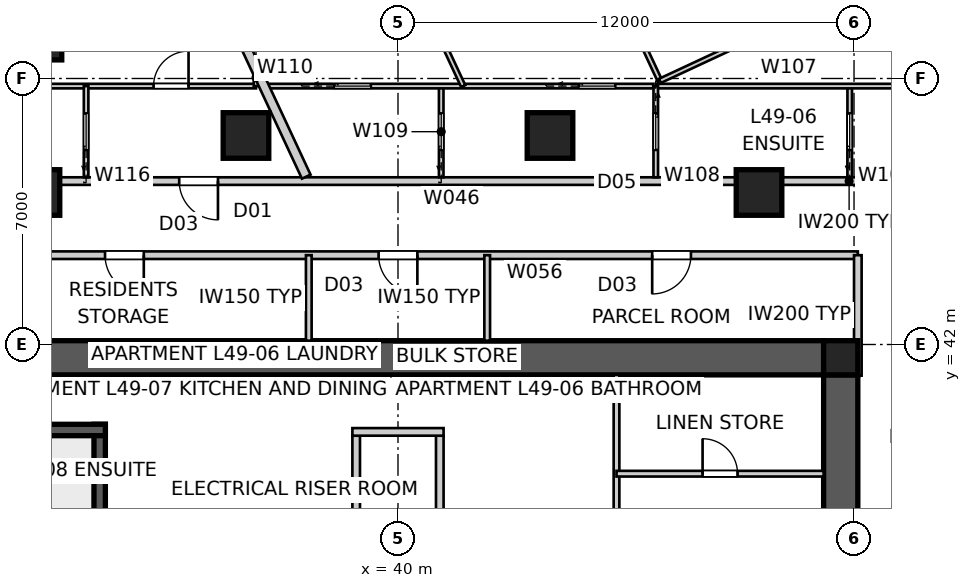
"""IFC4 building model, lengths in metres.
Left out: names, types, materials, properties, quantities, classifications, styles, units other than length and angle.
Written with IfcOpenShell. Run it as: python <this file> out.ifc"""

import sys

from ifc_helpers import new_model, si_unit, direction, frame, frame_2d, origin, origin_2d, place, context, subcontext, project, spatial, polyline, rectangle, outline, extrude, element, fill, save


model = new_model("IFC4")
c1 = context("Model", 3, precision=1e-05, world=origin(), true_north=direction((0.0, 1.0)))
c2 = subcontext(c1, "Body", "Model", "MODEL_VIEW")
j1 = project(units=[si_unit("LENGTHUNIT", "METRE"), si_unit("PLANEANGLEUNIT", "RADIAN")], contexts=[c1])
p1 = place(None, origin())
s1 = spatial("IfcSite", under=j1, at=p1, CompositionType="ELEMENT")
p2 = place(p1, origin())
s2 = spatial("IfcBuilding", under=s1, at=p2, CompositionType="ELEMENT")
p3 = place(p2, frame((0.0, 0.0, 179.4)))
s3 = spatial("IfcBuildingStorey", under=s2, at=p3, CompositionType="ELEMENT", Elevation=179.4)
p4 = place(p3, frame((28.8, 41.65, 0.0), z_axis=(0.0, 0.0, 1.0), x_axis=(1.0, 0.0, 0.0)))
e1 = element("IfcWall", 1, at=p4, inside=s3, PredefinedType="SHEAR", context=c2, shape_type="SweptSolid", body=[
    extrude(outline(polyline([(0.0, -0.45), (22.4, -0.45), (22.4, -0.025), (22.85, -0.025), (22.85, 0.025), (22.4, 0.025), (22.4, 0.45), (0.0, 0.45), (0.0, 0.025), (-0.45, 0.025), (-0.45, -0.025), (0.0, -0.025), (0.0, -0.45)])), origin(), (0.0, 0.0, 1.0), 3.4),
])
p5 = place(p3, frame((51.65, 18.8, 0.0), z_axis=(0.0, 0.0, 1.0), x_axis=(0.0, 1.0, 0.0)))
e2 = element("IfcWall", 2, at=p5, inside=s3, PredefinedType="SHEAR", context=c2, shape_type="SweptSolid", body=[
    extrude(outline(polyline([(0.0, -0.45), (22.4, -0.45), (22.4, -0.025), (22.85, -0.025), (22.85, 0.025), (22.4, 0.025), (22.4, 0.45), (0.0, 0.45), (0.0, 0.025), (-0.45, 0.025), (-0.45, -0.025), (0.0, -0.025), (0.0, -0.45)])), origin(), (0.0, 0.0, 1.0), 3.4),
])
p6 = place(p5, frame((11.14, 0.0, 0.0)))
e3 = element("IfcOpeningElement", 3, at=p6, cuts=e2, PredefinedType="OPENING", context=c2, shape_type="SweptSolid", body=[
    extrude(rectangle(XDim=1.02, YDim=2.4, at=frame_2d((0.51, 1.2))), frame((0.0, 0.46, 0.0), z_axis=(0.0, -1.0, 0.0), x_axis=(1.0, 0.0, 0.0)), (0.0, 0.0, 1.0), 0.92),
])
p7 = place(p3, frame((32.15, 32.2, 0.0), z_axis=(0.0, 0.0, 1.0), x_axis=(0.0, 1.0, 0.0)))
e4 = element("IfcWall", 4, at=p7, inside=s3, PredefinedType="SHEAR", context=c2, shape_type="SweptSolid", body=[
    extrude(rectangle(XDim=7.7, YDim=0.3, at=frame_2d((3.85, 0.0))), origin(), (0.0, 0.0, 1.0), 3.4),
])
p8 = place(p3, frame((28.8, 39.75, 0.0), z_axis=(0.0, 0.0, 1.0), x_axis=(1.0, 0.0, 0.0)))
e5 = element("IfcWall", 5, at=p8, inside=s3, PredefinedType="SHEAR", context=c2, shape_type="SweptSolid", body=[
    extrude(rectangle(XDim=3.5, YDim=0.3, at=frame_2d((1.75, 0.0))), origin(), (0.0, 0.0, 1.0), 3.4),
])
for number, where, z_axis, x_axis in (
    (6, (38.9, 37.6, 0.0), (0.0, 0.0, 1.0), (0.0, 1.0, 0.0)),
    (7, (41.1, 37.6, 0.0), (0.0, 0.0, 1.0), (0.0, 1.0, 0.0)),
):
    element("IfcWall", number, at=place(p3, frame(where, z_axis=z_axis, x_axis=x_axis)), inside=s3, PredefinedType="SOLIDWALL", context=c2, shape_type="SweptSolid", body=[
        extrude(rectangle(XDim=2.0, YDim=0.2, at=frame_2d((1.0, 0.0))), origin(), (0.0, 0.0, 1.0), 3.4),
    ])
p9 = place(p3, frame((38.8, 39.7, 0.0), z_axis=(0.0, 0.0, 1.0), x_axis=(1.0, 0.0, 0.0)))
e8 = element("IfcWall", 8, at=p9, inside=s3, PredefinedType="SOLIDWALL", context=c2, shape_type="SweptSolid", body=[
    extrude(rectangle(XDim=2.4, YDim=0.2, at=frame_2d((1.2, 0.0))), origin(), (0.0, 0.0, 1.0), 3.4),
])
for number, where, z_axis, x_axis in (
    (9, (51.65, 41.65, 0.0), (0.0, 0.0, 1.0), (1.0, 0.0, 0.0)),
    (10, (30.702, 49.939, 0.0), (0.0, 0.0, 1.0), (1.0, 0.0, 0.0)),
):
    element("IfcColumn", number, at=place(p3, frame(where, z_axis=z_axis, x_axis=x_axis)), inside=s3, PredefinedType="COLUMN", context=c2, shape_type="SweptSolid", body=[
        extrude(rectangle(XDim=0.9, YDim=0.9, at=origin_2d()), origin(), (0.0, 0.0, 1.0), 3.4),
    ])
for number, where, z_axis, x_axis in (
    (11, (49.5, 46.0, 0.0), (0.0, 0.0, 1.0), (1.0, 0.0, 0.0)),
    (12, (44.0, 47.5, 0.0), (0.0, 0.0, 1.0), (1.0, 0.0, 0.0)),
    (13, (36.0, 47.5, 0.0), (0.0, 0.0, 1.0), (1.0, 0.0, 0.0)),
    (14, (30.5, 46.0, 0.0), (0.0, 0.0, 1.0), (1.0, 0.0, 0.0)),
):
    element("IfcColumn", number, at=place(p3, frame(where, z_axis=z_axis, x_axis=x_axis)), inside=s3, PredefinedType="COLUMN", context=c2, shape_type="SweptSolid", body=[
        extrude(rectangle(XDim=1.2, YDim=1.2, at=origin_2d()), origin(), (0.0, 0.0, 1.0), 3.4),
    ])
p10 = place(p3, frame((54.5, 46.3, 0.0), z_axis=(0.0, 0.0, 1.0), x_axis=(-1.0, 0.0, 0.0)))
e15 = element("IfcWall", 15, at=p10, inside=s3, PredefinedType="PARTITIONING", context=c2, shape_type="SweptSolid", body=[
    extrude(rectangle(XDim=5.258, YDim=0.2, at=frame_2d((2.629, 0.0))), origin(), (0.0, 0.0, 1.0), 3.25),
])
p11 = place(p3, frame((49.242, 46.3, 0.0), z_axis=(0.0, 0.0, 1.0), x_axis=(-1.0, 0.0, 0.0)))
e16 = element("IfcWall", 16, at=p11, inside=s3, PredefinedType="PARTITIONING", context=c2, shape_type="SweptSolid", body=[
    extrude(rectangle(XDim=1.683, YDim=0.2, at=frame_2d((0.842, 0.0))), origin(), (0.0, 0.0, 1.0), 2.55),
])
p12 = place(p3, frame((47.558, 46.3, 0.0), z_axis=(0.0, 0.0, 1.0), x_axis=(-1.0, 0.0, 0.0)))
e17 = element("IfcWall", 17, at=p12, inside=s3, PredefinedType="PARTITIONING", context=c2, shape_type="SweptSolid", body=[
    extrude(rectangle(XDim=15.117, YDim=0.2, at=frame_2d((7.558, 0.0))), origin(), (0.0, 0.0, 1.0), 3.25),
])
p13 = place(p12, frame((12.295, 0.0, 0.0)))
e18 = element("IfcOpeningElement", 18, at=p13, cuts=e17, PredefinedType="OPENING", context=c2, shape_type="SweptSolid", body=[
    extrude(rectangle(XDim=1.02, YDim=2.34, at=frame_2d((0.51, 1.17))), frame((0.0, 0.11, 0.0), z_axis=(0.0, -1.0, 0.0), x_axis=(1.0, 0.0, 0.0)), (0.0, 0.0, 1.0), 0.22),
])
p14 = place(p3, frame((32.442, 46.3, 0.0), z_axis=(0.0, 0.0, 1.0), x_axis=(-1.0, 0.0, 0.0)))
e19 = element("IfcWall", 19, at=p14, inside=s3, PredefinedType="PARTITIONING", context=c2, shape_type="SweptSolid", body=[
    extrude(rectangle(XDim=1.683, YDim=0.2, at=frame_2d((0.842, 0.0))), origin(), (0.0, 0.0, 1.0), 2.55),
])
p15 = place(p3, frame((34.585, 52.853, 0.0), z_axis=(0.0, 0.0, 1.0), x_axis=(0.422623839356, -0.906305186131, 0.0)))
e20 = element("IfcWall", 20, at=p15, inside=s3, PredefinedType="PARTITIONING", context=c2, shape_type="SweptSolid", body=[
    extrude(rectangle(XDim=7.101, YDim=0.25, at=frame_2d((3.551, 0.0))), origin(), (0.0, 0.0, 1.0), 3.25),
])
p16 = place(p3, frame((45.75, 41.2, 0.0), z_axis=(0.0, 0.0, 1.0), x_axis=(0.0, -1.0, 0.0)))
e21 = element("IfcWall", 21, at=p16, inside=s3, PredefinedType="SOLIDWALL", context=c2, shape_type="SweptSolid", body=[
    extrude(rectangle(XDim=5.9, YDim=0.15, at=frame_2d((2.95, 0.0))), origin(), (0.0, 0.0, 1.0), 3.25),
])
p17 = place(p3, frame((45.75, 38.6, 0.0), z_axis=(0.0, 0.0, 1.0), x_axis=(1.0, 0.0, 0.0)))
e22 = element("IfcWall", 22, at=p17, inside=s3, PredefinedType="SOLIDWALL", context=c2, shape_type="SweptSolid", body=[
    extrude(rectangle(XDim=5.45, YDim=0.15, at=frame_2d((2.725, 0.0))), origin(), (0.0, 0.0, 1.0), 3.25),
])
p18 = place(p17, frame((2.265, 0.0, 0.0)))
e23 = element("IfcOpeningElement", 23, at=p18, cuts=e22, PredefinedType="OPENING", context=c2, shape_type="SweptSolid", body=[
    extrude(rectangle(XDim=0.92, YDim=2.1, at=frame_2d((0.46, 1.05))), frame((0.0, 0.085, 0.0), z_axis=(0.0, -1.0, 0.0), x_axis=(1.0, 0.0, 0.0)), (0.0, 0.0, 1.0), 0.17),
])
p19 = place(p3, frame((52.1, 44.35, 0.0), z_axis=(0.0, 0.0, 1.0), x_axis=(-1.0, 0.0, 0.0)))
e24 = element("IfcWall", 24, at=p19, inside=s3, PredefinedType="PARTITIONING", context=c2, shape_type="SweptSolid", body=[
    extrude(rectangle(XDim=24.2, YDim=0.2, at=frame_2d((12.1, 0.0))), origin(), (0.0, 0.0, 1.0), 3.25),
])
p20 = place(p19, frame((18.789, 0.0, 0.0)))
e25 = element("IfcOpeningElement", 25, at=p20, cuts=e24, PredefinedType="OPENING", context=c2, shape_type="SweptSolid", body=[
    extrude(rectangle(XDim=1.02, YDim=2.1, at=frame_2d((0.51, 1.05))), frame((0.0, 0.11, 0.0), z_axis=(0.0, -1.0, 0.0), x_axis=(1.0, 0.0, 0.0)), (0.0, 0.0, 1.0), 0.22),
])
p21 = place(p19, frame((4.391, 0.0, 0.0)))
e26 = element("IfcOpeningElement", 26, at=p21, cuts=e24, PredefinedType="OPENING", context=c2, shape_type="SweptSolid", body=[
    extrude(rectangle(XDim=1.02, YDim=2.1, at=frame_2d((0.51, 1.05))), frame((0.0, 0.11, 0.0), z_axis=(0.0, -1.0, 0.0), x_axis=(1.0, 0.0, 0.0)), (0.0, 0.0, 1.0), 0.22),
])
p22 = place(p19, frame((11.59, 0.0, 0.0)))
e27 = element("IfcOpeningElement", 27, at=p22, cuts=e24, PredefinedType="OPENING", context=c2, shape_type="SweptSolid", body=[
    extrude(rectangle(XDim=1.02, YDim=2.1, at=frame_2d((0.51, 1.05))), frame((0.0, 0.11, 0.0), z_axis=(0.0, -1.0, 0.0), x_axis=(1.0, 0.0, 0.0)), (0.0, 0.0, 1.0), 0.22),
])
p23 = place(p3, frame((52.1, 41.18, 0.0), z_axis=(0.0, 0.0, 1.0), x_axis=(0.0, 1.0, 0.0)))
e28 = element("IfcWall", 28, at=p23, inside=s3, PredefinedType="PARTITIONING", context=c2, shape_type="SweptSolid", body=[
    extrude(rectangle(XDim=3.17, YDim=0.2, at=frame_2d((1.585, 0.0))), origin(), (0.0, 0.0, 1.0), 3.25),
])
for number, where, z_axis, x_axis in (
    (29, (37.653, 42.1, 0.0), (0.0, 0.0, 1.0), (0.0, 1.0, 0.0)),
    (30, (42.347, 42.1, 0.0), (0.0, 0.0, 1.0), (0.0, 1.0, 0.0)),
):
    element("IfcWall", number, at=place(p3, frame(where, z_axis=z_axis, x_axis=x_axis)), inside=s3, PredefinedType="SOLIDWALL", context=c2, shape_type="SweptSolid", body=[
        extrude(rectangle(XDim=2.25, YDim=0.15, at=frame_2d((1.125, 0.0))), origin(), (0.0, 0.0, 1.0), 3.25),
    ])
p24 = place(p3, frame((51.886, 46.4, 0.0), z_axis=(0.0, 0.0, 1.0), x_axis=(0.0, 1.0, 0.0)))
e31 = element("IfcWall", 31, at=p24, inside=s3, PredefinedType="PARTITIONING", context=c2, shape_type="SweptSolid", body=[
    extrude(rectangle(XDim=2.4, YDim=0.12, at=frame_2d((1.2, 0.0))), origin(), (0.0, 0.0, 1.0), 3.25),
])
p25 = place(p24, frame((0.72, 0.0, 0.0)))
e32 = element("IfcOpeningElement", 32, at=p25, cuts=e31, PredefinedType="OPENING", context=c2, shape_type="SweptSolid", body=[
    extrude(rectangle(XDim=0.96, YDim=2.1, at=frame_2d((0.48, 1.05))), frame((0.0, 0.07, 0.0), z_axis=(0.0, -1.0, 0.0), x_axis=(1.0, 0.0, 0.0)), (0.0, 0.0, 1.0), 0.14),
])
p26 = place(p3, frame((46.783, 48.8, 0.0), z_axis=(0.0, 0.0, 1.0), x_axis=(1.0, 0.0, 0.0)))
e33 = element("IfcWall", 33, at=p26, inside=s3, PredefinedType="PARTITIONING", context=c2, shape_type="SweptSolid", body=[
    extrude(rectangle(XDim=9.784, YDim=0.12, at=frame_2d((4.892, 0.0))), origin(), (0.0, 0.0, 1.0), 3.25),
])
p27 = place(p26, frame((7.006, 0.0, 0.0)))
e34 = element("IfcOpeningElement", 34, at=p27, cuts=e33, PredefinedType="OPENING", context=c2, shape_type="SweptSolid", body=[
    extrude(rectangle(XDim=0.92, YDim=2.34, at=frame_2d((0.46, 1.17))), frame((0.0, 0.07, 0.0), z_axis=(0.0, -1.0, 0.0), x_axis=(1.0, 0.0, 0.0)), (0.0, 0.0, 1.0), 0.14),
])
p28 = place(p3, frame((46.783, 48.8, 0.0), z_axis=(0.0, 0.0, 1.0), x_axis=(0.0, -1.0, 0.0)))
e35 = element("IfcWall", 35, at=p28, inside=s3, PredefinedType="PARTITIONING", context=c2, shape_type="SweptSolid", body=[
    extrude(rectangle(XDim=2.4, YDim=0.12, at=frame_2d((1.2, 0.0))), origin(), (0.0, 0.0, 1.0), 3.25),
])
p29 = place(p28, frame((0.72, 0.0, 0.0)))
e36 = element("IfcOpeningElement", 36, at=p29, cuts=e35, PredefinedType="OPENING", context=c2, shape_type="SweptSolid", body=[
    extrude(rectangle(XDim=0.96, YDim=2.1, at=frame_2d((0.48, 1.05))), frame((0.0, 0.07, 0.0), z_axis=(0.0, -1.0, 0.0), x_axis=(1.0, 0.0, 0.0)), (0.0, 0.0, 1.0), 0.14),
])
p30 = place(p3, frame((41.137, 46.4, 0.0), z_axis=(0.0, 0.0, 1.0), x_axis=(0.0, 1.0, 0.0)))
e37 = element("IfcWall", 37, at=p30, inside=s3, PredefinedType="PARTITIONING", context=c2, shape_type="SweptSolid", body=[
    extrude(rectangle(XDim=2.4, YDim=0.12, at=frame_2d((1.2, 0.0))), origin(), (0.0, 0.0, 1.0), 3.25),
])
p31 = place(p30, frame((0.72, 0.0, 0.0)))
e38 = element("IfcOpeningElement", 38, at=p31, cuts=e37, PredefinedType="OPENING", context=c2, shape_type="SweptSolid", body=[
    extrude(rectangle(XDim=0.96, YDim=2.1, at=frame_2d((0.48, 1.05))), frame((0.0, 0.07, 0.0), z_axis=(0.0, -1.0, 0.0), x_axis=(1.0, 0.0, 0.0)), (0.0, 0.0, 1.0), 0.14),
])
p32 = place(p3, frame((36.475, 48.8, 0.0), z_axis=(0.0, 0.0, 1.0), x_axis=(1.0, 0.0, 0.0)))
e39 = element("IfcWall", 39, at=p32, inside=s3, PredefinedType="PARTITIONING", context=c2, shape_type="SweptSolid", body=[
    extrude(rectangle(XDim=10.242, YDim=0.12, at=frame_2d((5.121, 0.0))), origin(), (0.0, 0.0, 1.0), 3.25),
])
p33 = place(p32, frame((8.284, 0.0, 0.0)))
e40 = element("IfcOpeningElement", 40, at=p33, cuts=e39, PredefinedType="OPENING", context=c2, shape_type="SweptSolid", body=[
    extrude(rectangle(XDim=0.96, YDim=2.1, at=frame_2d((0.48, 1.05))), frame((0.0, 0.07, 0.0), z_axis=(0.0, -1.0, 0.0), x_axis=(1.0, 0.0, 0.0)), (0.0, 0.0, 1.0), 0.14),
])
p34 = place(p32, frame((1.851, 0.0, 0.0)))
e41 = element("IfcOpeningElement", 41, at=p34, cuts=e39, PredefinedType="OPENING", context=c2, shape_type="SweptSolid", body=[
    extrude(rectangle(XDim=0.96, YDim=2.1, at=frame_2d((0.48, 1.05))), frame((0.0, 0.07, 0.0), z_axis=(0.0, -1.0, 0.0), x_axis=(1.0, 0.0, 0.0)), (0.0, 0.0, 1.0), 0.14),
])
p35 = place(p3, frame((46.893, 48.937, 0.0), z_axis=(0.0, 0.0, 1.0), x_axis=(-0.422638395676, 0.906298398156, 0.0)))
e42 = element("IfcWall", 42, at=p35, inside=s3, PredefinedType="PARTITIONING", context=c2, shape_type="SweptSolid", body=[
    extrude(rectangle(XDim=8.71, YDim=0.12, at=frame_2d((4.355, 0.0))), origin(), (0.0, 0.0, 1.0), 3.25),
])
p36 = place(p3, frame((54.787, 52.618, 0.0), z_axis=(0.0, 0.0, 1.0), x_axis=(-0.906314140712, -0.422604635972, 0.0)))
e43 = element("IfcWall", 43, at=p36, inside=s3, PredefinedType="PARTITIONING", context=c2, shape_type="SweptSolid", body=[
    extrude(rectangle(XDim=8.71, YDim=0.12, at=frame_2d((4.355, 0.0))), origin(), (0.0, 0.0, 1.0), 3.25),
])
p37 = place(p36, frame((3.875, 0.0, 0.0)))
e44 = element("IfcOpeningElement", 44, at=p37, cuts=e43, PredefinedType="OPENING", context=c2, shape_type="SweptSolid", body=[
    extrude(rectangle(XDim=0.92, YDim=2.34, at=frame_2d((0.46, 1.17))), frame((0.0, 0.07, 0.0), z_axis=(0.0, -1.0, 0.0), x_axis=(1.0, 0.0, 0.0)), (0.0, 0.0, 1.0), 0.14),
])
p38 = place(p3, frame((41.716, 48.8, 0.0), z_axis=(0.0, 0.0, 1.0), x_axis=(-0.422642131948, 0.906296655793, 0.0)))
e45 = element("IfcWall", 45, at=p38, inside=s3, PredefinedType="PARTITIONING", context=c2, shape_type="SweptSolid", body=[
    extrude(rectangle(XDim=6.646, YDim=0.12, at=frame_2d((3.323, 0.0))), origin(), (0.0, 0.0, 1.0), 3.25),
])
p39 = place(p3, frame((25.993, 48.8, 0.0), z_axis=(0.0, 0.0, 1.0), x_axis=(1.0, 0.0, 0.0)))
e46 = element("IfcWall", 46, at=p39, inside=s3, PredefinedType="PARTITIONING", context=c2, shape_type="SweptSolid", body=[
    extrude(rectangle(XDim=10.272, YDim=0.12, at=frame_2d((5.136, 0.0))), origin(), (0.0, 0.0, 1.0), 3.25),
])
p40 = place(p39, frame((7.576, 0.0, 0.0)))
e47 = element("IfcOpeningElement", 47, at=p40, cuts=e46, PredefinedType="OPENING", context=c2, shape_type="SweptSolid", body=[
    extrude(rectangle(XDim=0.92, YDim=2.34, at=frame_2d((0.46, 1.17))), frame((0.0, 0.07, 0.0), z_axis=(0.0, -1.0, 0.0), x_axis=(1.0, 0.0, 0.0)), (0.0, 0.0, 1.0), 0.14),
])
p41 = place(p3, frame((36.265, 48.8, 0.0), z_axis=(0.0, 0.0, 1.0), x_axis=(0.0, 1.0, 0.0)))
e48 = element("IfcWall", 48, at=p41, inside=s3, PredefinedType="PARTITIONING", context=c2, shape_type="SweptSolid", body=[
    extrude(rectangle(XDim=0.45, YDim=0.12, at=frame_2d((0.225, 0.0))), origin(), (0.0, 0.0, 1.0), 3.25),
])
p42 = place(p3, frame((31.793, 46.4, 0.0), z_axis=(0.0, 0.0, 1.0), x_axis=(0.0, 1.0, 0.0)))
e49 = element("IfcWall", 49, at=p42, inside=s3, PredefinedType="PARTITIONING", context=c2, shape_type="SweptSolid", body=[
    extrude(rectangle(XDim=2.4, YDim=0.12, at=frame_2d((1.2, 0.0))), origin(), (0.0, 0.0, 1.0), 3.25),
])
p43 = place(p42, frame((0.72, 0.0, 0.0)))
e50 = element("IfcOpeningElement", 50, at=p43, cuts=e49, PredefinedType="OPENING", context=c2, shape_type="SweptSolid", body=[
    extrude(rectangle(XDim=0.96, YDim=2.1, at=frame_2d((0.48, 1.05))), frame((0.0, 0.07, 0.0), z_axis=(0.0, -1.0, 0.0), x_axis=(1.0, 0.0, 0.0)), (0.0, 0.0, 1.0), 0.14),
])
p44 = place(p20, origin())
e51 = element("IfcDoor", 51, at=p44, inside=s3, OperationType="SINGLE_SWING_LEFT", PredefinedType="DOOR", context=c2, shape_type="SweptSolid", body=[
    extrude(rectangle(XDim=1.02, YDim=2.1, at=frame_2d((0.51, 1.05))), frame((0.0, 0.025, 0.0), z_axis=(0.0, -1.0, 0.0), x_axis=(1.0, 0.0, 0.0)), (0.0, 0.0, 1.0), 0.05),
])
fill(e25, e51)
p45 = place(p21, origin())
e52 = element("IfcDoor", 52, at=p45, inside=s3, OperationType="SINGLE_SWING_RIGHT", PredefinedType="DOOR", context=c2, shape_type="SweptSolid", body=[
    extrude(rectangle(XDim=1.02, YDim=2.1, at=frame_2d((0.51, 1.05))), frame((0.0, 0.025, 0.0), z_axis=(0.0, -1.0, 0.0), x_axis=(1.0, 0.0, 0.0)), (0.0, 0.0, 1.0), 0.05),
])
fill(e26, e52)
p46 = place(p13, origin())
e53 = element("IfcDoor", 53, at=p46, inside=s3, OperationType="SINGLE_SWING_LEFT", PredefinedType="DOOR", context=c2, shape_type="SweptSolid", body=[
    extrude(rectangle(XDim=1.02, YDim=2.34, at=frame_2d((0.51, 1.17))), frame((0.0, 0.025, 0.0), z_axis=(0.0, -1.0, 0.0), x_axis=(1.0, 0.0, 0.0)), (0.0, 0.0, 1.0), 0.05),
])
fill(e18, e53)
p47 = place(p22, origin())
e54 = element("IfcDoor", 54, at=p47, inside=s3, OperationType="SINGLE_SWING_LEFT", PredefinedType="DOOR", context=c2, shape_type="SweptSolid", body=[
    extrude(rectangle(XDim=1.02, YDim=2.1, at=frame_2d((0.51, 1.05))), frame((0.0, 0.025, 0.0), z_axis=(0.0, -1.0, 0.0), x_axis=(1.0, 0.0, 0.0)), (0.0, 0.0, 1.0), 0.05),
])
fill(e27, e54)
p48 = place(p18, origin())
e55 = element("IfcDoor", 55, at=p48, inside=s3, OperationType="SINGLE_SWING_LEFT", PredefinedType="DOOR", context=c2, shape_type="SweptSolid", body=[
    extrude(rectangle(XDim=0.92, YDim=2.1, at=frame_2d((0.46, 1.05))), frame((0.0, 0.025, 0.0), z_axis=(0.0, -1.0, 0.0), x_axis=(1.0, 0.0, 0.0)), (0.0, 0.0, 1.0), 0.05),
])
fill(e23, e55)
p49 = place(p40, origin())
e56 = element("IfcDoor", 56, at=p49, inside=s3, OperationType="SINGLE_SWING_RIGHT", PredefinedType="DOOR", context=c2, shape_type="SweptSolid", body=[
    extrude(rectangle(XDim=0.92, YDim=2.34, at=frame_2d((0.46, 1.17))), frame((0.0, 0.025, 0.0), z_axis=(0.0, -1.0, 0.0), x_axis=(1.0, 0.0, 0.0)), (0.0, 0.0, 1.0), 0.05),
])
fill(e47, e56)
p50 = place(p43, origin())
e57 = element("IfcDoor", 57, at=p50, inside=s3, OperationType="SLIDING_TO_LEFT", PredefinedType="DOOR", context=c2, shape_type="SweptSolid", body=[
    extrude(rectangle(XDim=0.96, YDim=2.1, at=frame_2d((0.48, 1.05))), frame((0.0, 0.025, 0.0), z_axis=(0.0, -1.0, 0.0), x_axis=(1.0, 0.0, 0.0)), (0.0, 0.0, 1.0), 0.05),
])
fill(e50, e57)
p51 = place(p25, origin())
e58 = element("IfcDoor", 58, at=p51, inside=s3, OperationType="SLIDING_TO_LEFT", PredefinedType="DOOR", context=c2, shape_type="SweptSolid", body=[
    extrude(rectangle(XDim=0.96, YDim=2.1, at=frame_2d((0.48, 1.05))), frame((0.0, 0.025, 0.0), z_axis=(0.0, -1.0, 0.0), x_axis=(1.0, 0.0, 0.0)), (0.0, 0.0, 1.0), 0.05),
])
fill(e32, e58)
p52 = place(p29, origin())
e59 = element("IfcDoor", 59, at=p52, inside=s3, OperationType="SLIDING_TO_LEFT", PredefinedType="DOOR", context=c2, shape_type="SweptSolid", body=[
    extrude(rectangle(XDim=0.96, YDim=2.1, at=frame_2d((0.48, 1.05))), frame((0.0, 0.025, 0.0), z_axis=(0.0, -1.0, 0.0), x_axis=(1.0, 0.0, 0.0)), (0.0, 0.0, 1.0), 0.05),
])
fill(e36, e59)
p53 = place(p33, origin())
e60 = element("IfcDoor", 60, at=p53, inside=s3, OperationType="SLIDING_TO_LEFT", PredefinedType="DOOR", context=c2, shape_type="SweptSolid", body=[
    extrude(rectangle(XDim=0.96, YDim=2.1, at=frame_2d((0.48, 1.05))), frame((0.0, 0.025, 0.0), z_axis=(0.0, -1.0, 0.0), x_axis=(1.0, 0.0, 0.0)), (0.0, 0.0, 1.0), 0.05),
])
fill(e40, e60)
p54 = place(p31, origin())
e61 = element("IfcDoor", 61, at=p54, inside=s3, OperationType="SLIDING_TO_LEFT", PredefinedType="DOOR", context=c2, shape_type="SweptSolid", body=[
    extrude(rectangle(XDim=0.96, YDim=2.1, at=frame_2d((0.48, 1.05))), frame((0.0, 0.025, 0.0), z_axis=(0.0, -1.0, 0.0), x_axis=(1.0, 0.0, 0.0)), (0.0, 0.0, 1.0), 0.05),
])
fill(e38, e61)
p55 = place(p34, origin())
e62 = element("IfcDoor", 62, at=p55, inside=s3, OperationType="SLIDING_TO_LEFT", PredefinedType="DOOR", context=c2, shape_type="SweptSolid", body=[
    extrude(rectangle(XDim=0.96, YDim=2.1, at=frame_2d((0.48, 1.05))), frame((0.0, 0.025, 0.0), z_axis=(0.0, -1.0, 0.0), x_axis=(1.0, 0.0, 0.0)), (0.0, 0.0, 1.0), 0.05),
])
fill(e41, e62)
save(model, sys.argv[1])
